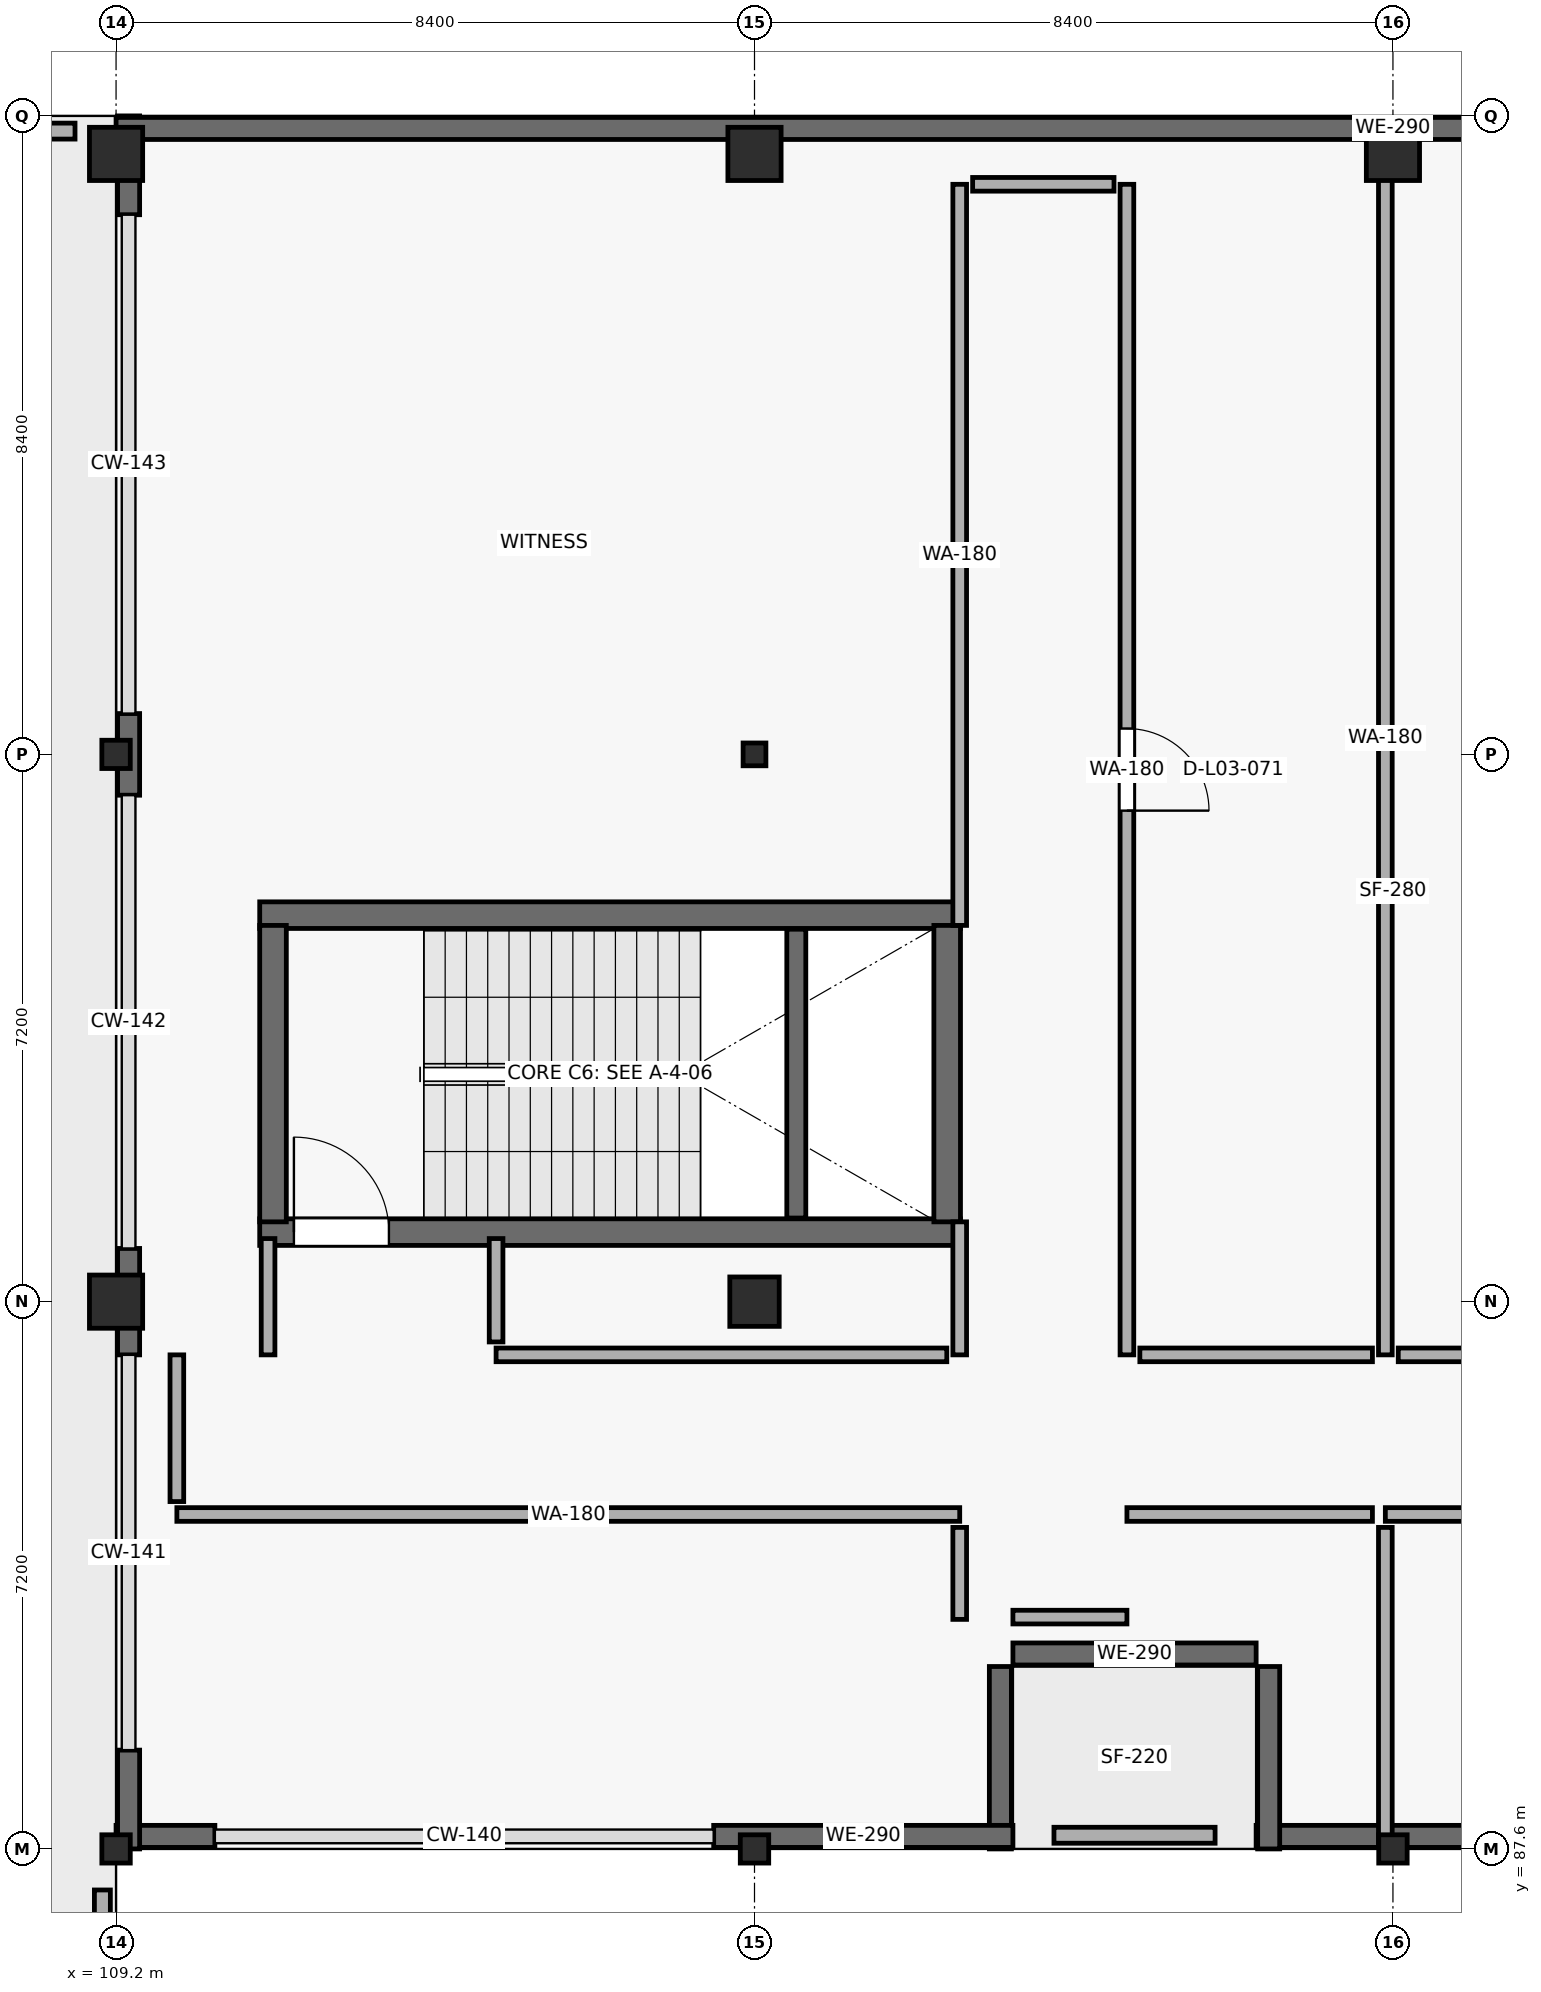
"""IFC4 building model, lengths in metres.
Left out: names, types, materials, properties, quantities, classifications, styles, units other than length and angle.
Written with IfcOpenShell. Run it as: python <this file> out.ifc"""

import sys

from ifc_helpers import new_model, si_unit, direction, frame, frame_2d, origin, origin_2d, place, context, subcontext, project, spatial, rectangle, hollow_rectangle, i_section, extrude, element, fill, save


model = new_model("IFC4")
c1 = context("Model", 3, precision=1e-05, world=origin(), true_north=direction((0.0, 1.0)))
c2 = subcontext(c1, "Body", "Model", "MODEL_VIEW")
j1 = project(units=[si_unit("LENGTHUNIT", "METRE"), si_unit("PLANEANGLEUNIT", "RADIAN")], contexts=[c1])
p1 = place(None, origin())
s1 = spatial("IfcSite", under=j1, at=p1, CompositionType="ELEMENT")
p2 = place(p1, origin())
s2 = spatial("IfcBuilding", under=s1, at=p2, CompositionType="ELEMENT")
p3 = place(p2, frame((0.0, 0.0, 10.2)))
s3 = spatial("IfcBuildingStorey", under=s2, at=p3, CompositionType="ELEMENT", Elevation=10.2)
p4 = place(p3, frame((109.2, 87.6, 0.0), z_axis=(0.0, 0.0, 1.0), x_axis=(1.0, 0.0, 0.0)))
e1 = element("IfcColumn", 1, at=p4, inside=s3, PredefinedType="COLUMN", context=c2, shape_type="SweptSolid", body=[
    extrude(i_section(OverallWidth=0.374, OverallDepth=0.372, WebThickness=0.016, FlangeThickness=0.026, at=origin_2d()), origin(), (0.0, 0.0, 1.0), 5.1),
])
p5 = place(p3, frame((109.2, 94.8, 0.0), z_axis=(0.0, 0.0, 1.0), x_axis=(1.0, 0.0, 0.0)))
e2 = element("IfcColumn", 2, at=p5, inside=s3, PredefinedType="COLUMN", context=c2, shape_type="SweptSolid", body=[
    extrude(rectangle(XDim=0.7, YDim=0.7, at=origin_2d()), origin(), (0.0, 0.0, 1.0), 5.1),
])
p6 = place(p3, frame((109.2, 102.0, 0.0), z_axis=(0.0, 0.0, 1.0), x_axis=(1.0, 0.0, 0.0)))
e3 = element("IfcColumn", 3, at=p6, inside=s3, PredefinedType="COLUMN", context=c2, shape_type="SweptSolid", body=[
    extrude(i_section(OverallWidth=0.374, OverallDepth=0.372, WebThickness=0.016, FlangeThickness=0.026, at=origin_2d()), origin(), (0.0, 0.0, 1.0), 5.1),
])
p7 = place(p3, frame((109.2, 109.9, 0.0), z_axis=(0.0, 0.0, 1.0), x_axis=(1.0, 0.0, 0.0)))
e4 = element("IfcColumn", 4, at=p7, inside=s3, PredefinedType="COLUMN", context=c2, shape_type="SweptSolid", body=[
    extrude(rectangle(XDim=0.7, YDim=0.7, at=origin_2d()), origin(), (0.0, 0.0, 1.0), 5.1),
])
p8 = place(p3, frame((117.6, 87.6, 0.0), z_axis=(0.0, 0.0, 1.0), x_axis=(1.0, 0.0, 0.0)))
e5 = element("IfcColumn", 5, at=p8, inside=s3, PredefinedType="COLUMN", context=c2, shape_type="SweptSolid", body=[
    extrude(i_section(OverallWidth=0.374, OverallDepth=0.372, WebThickness=0.016, FlangeThickness=0.026, at=origin_2d()), origin(), (0.0, 0.0, 1.0), 5.1),
])
p9 = place(p3, frame((117.6, 94.8, 0.0), z_axis=(0.0, 0.0, 1.0), x_axis=(1.0, 0.0, 0.0)))
e6 = element("IfcColumn", 6, at=p9, inside=s3, PredefinedType="COLUMN", context=c2, shape_type="SweptSolid", body=[
    extrude(rectangle(XDim=0.65, YDim=0.65, at=origin_2d()), origin(), (0.0, 0.0, 1.0), 5.1),
])
p10 = place(p3, frame((117.6, 102.0, 0.0), z_axis=(0.0, 0.0, 1.0), x_axis=(1.0, 0.0, 0.0)))
e7 = element("IfcColumn", 7, at=p10, inside=s3, PredefinedType="COLUMN", context=c2, shape_type="SweptSolid", body=[
    extrude(hollow_rectangle(XDim=0.3, YDim=0.3, WallThickness=0.012, at=origin_2d()), origin(), (0.0, 0.0, 1.0), 5.1),
])
p11 = place(p3, frame((117.6, 109.9, 0.0), z_axis=(0.0, 0.0, 1.0), x_axis=(1.0, 0.0, 0.0)))
e8 = element("IfcColumn", 8, at=p11, inside=s3, PredefinedType="COLUMN", context=c2, shape_type="SweptSolid", body=[
    extrude(rectangle(XDim=0.7, YDim=0.7, at=origin_2d()), origin(), (0.0, 0.0, 1.0), 5.1),
])
p12 = place(p3, frame((126.0, 87.6, 0.0), z_axis=(0.0, 0.0, 1.0), x_axis=(1.0, 0.0, 0.0)))
e9 = element("IfcColumn", 9, at=p12, inside=s3, PredefinedType="COLUMN", context=c2, shape_type="SweptSolid", body=[
    extrude(i_section(OverallWidth=0.374, OverallDepth=0.372, WebThickness=0.016, FlangeThickness=0.026, at=origin_2d()), origin(), (0.0, 0.0, 1.0), 5.1),
])
p13 = place(p3, frame((126.0, 109.9, 0.0), z_axis=(0.0, 0.0, 1.0), x_axis=(1.0, 0.0, 0.0)))
e10 = element("IfcColumn", 10, at=p13, inside=s3, PredefinedType="COLUMN", context=c2, shape_type="SweptSolid", body=[
    extrude(rectangle(XDim=0.7, YDim=0.7, at=origin_2d()), origin(), (0.0, 0.0, 1.0), 5.1),
])
p14 = place(p3, frame((142.8, 87.765, 0.0), z_axis=(0.0, 0.0, 1.0), x_axis=(-1.0, 0.0, 0.0)))
e11 = element("IfcWall", 11, at=p14, inside=s3, PredefinedType="SOLIDWALL", context=c2, shape_type="SweptSolid", body=[
    extrude(rectangle(XDim=18.6, YDim=0.29, at=frame_2d((9.3, 0.0))), origin(), (0.0, 0.0, 1.0), 4.82),
])
p15 = place(p3, frame((124.365, 87.6, 0.0), z_axis=(0.0, 0.0, 1.0), x_axis=(0.0, 1.0, 0.0)))
e12 = element("IfcWall", 12, at=p15, inside=s3, PredefinedType="SOLIDWALL", context=c2, shape_type="SweptSolid", body=[
    extrude(rectangle(XDim=2.4, YDim=0.29, at=frame_2d((1.2, 0.0))), origin(), (0.0, 0.0, 1.0), 4.82),
])
p16 = place(p3, frame((124.2, 90.165, 0.0), z_axis=(0.0, 0.0, 1.0), x_axis=(-1.0, 0.0, 0.0)))
e13 = element("IfcWall", 13, at=p16, inside=s3, PredefinedType="SOLIDWALL", context=c2, shape_type="SweptSolid", body=[
    extrude(rectangle(XDim=3.2, YDim=0.29, at=frame_2d((1.6, 0.0))), origin(), (0.0, 0.0, 1.0), 4.82),
])
p17 = place(p3, frame((120.835, 90.0, 0.0), z_axis=(0.0, 0.0, 1.0), x_axis=(0.0, -1.0, 0.0)))
e14 = element("IfcWall", 14, at=p17, inside=s3, PredefinedType="SOLIDWALL", context=c2, shape_type="SweptSolid", body=[
    extrude(rectangle(XDim=2.4, YDim=0.29, at=frame_2d((1.2, 0.0))), origin(), (0.0, 0.0, 1.0), 4.82),
])
p18 = place(p3, frame((121.0, 87.765, 0.0), z_axis=(0.0, 0.0, 1.0), x_axis=(-1.0, 0.0, 0.0)))
e15 = element("IfcWall", 15, at=p18, inside=s3, PredefinedType="SOLIDWALL", context=c2, shape_type="SweptSolid", body=[
    extrude(rectangle(XDim=3.937, YDim=0.29, at=frame_2d((1.969, 0.0))), origin(), (0.0, 0.0, 1.0), 4.82),
])
p19 = place(p3, frame((110.5, 87.765, 0.0), z_axis=(0.0, 0.0, 1.0), x_axis=(-1.0, 0.0, 0.0)))
e16 = element("IfcWall", 16, at=p19, inside=s3, PredefinedType="SOLIDWALL", context=c2, shape_type="SweptSolid", body=[
    extrude(rectangle(XDim=1.3, YDim=0.29, at=frame_2d((0.65, 0.0))), origin(), (0.0, 0.0, 1.0), 4.82),
])
p20 = place(p3, frame((109.365, 87.6, 0.0), z_axis=(0.0, 0.0, 1.0), x_axis=(0.0, 1.0, 0.0)))
e17 = element("IfcWall", 17, at=p20, inside=s3, PredefinedType="SOLIDWALL", context=c2, shape_type="SweptSolid", body=[
    extrude(rectangle(XDim=1.3, YDim=0.29, at=frame_2d((0.65, 0.0))), origin(), (0.0, 0.0, 1.0), 4.82),
])
p21 = place(p3, frame((109.365, 94.1, 0.0), z_axis=(0.0, 0.0, 1.0), x_axis=(0.0, 1.0, 0.0)))
e18 = element("IfcWall", 18, at=p21, inside=s3, PredefinedType="SOLIDWALL", context=c2, shape_type="SweptSolid", body=[
    extrude(rectangle(XDim=1.4, YDim=0.29, at=frame_2d((0.7, 0.0))), origin(), (0.0, 0.0, 1.0), 4.82),
])
p22 = place(p3, frame((109.365, 101.463, 0.0), z_axis=(0.0, 0.0, 1.0), x_axis=(0.0, 1.0, 0.0)))
e19 = element("IfcWall", 19, at=p22, inside=s3, PredefinedType="SOLIDWALL", context=c2, shape_type="SweptSolid", body=[
    extrude(rectangle(XDim=1.074, YDim=0.29, at=frame_2d((0.537, 0.0))), origin(), (0.0, 0.0, 1.0), 4.82),
])
p23 = place(p3, frame((109.365, 109.1, 0.0), z_axis=(0.0, 0.0, 1.0), x_axis=(0.0, 1.0, 0.0)))
e20 = element("IfcWall", 20, at=p23, inside=s3, PredefinedType="SOLIDWALL", context=c2, shape_type="SweptSolid", body=[
    extrude(rectangle(XDim=1.3, YDim=0.29, at=frame_2d((0.65, 0.0))), origin(), (0.0, 0.0, 1.0), 4.82),
])
p24 = place(p3, frame((109.2, 110.235, 0.0), z_axis=(0.0, 0.0, 1.0), x_axis=(1.0, 0.0, 0.0)))
e21 = element("IfcWall", 21, at=p24, inside=s3, PredefinedType="SOLIDWALL", context=c2, shape_type="SweptSolid", body=[
    extrude(rectangle(XDim=33.6, YDim=0.29, at=frame_2d((16.8, 0.0))), origin(), (0.0, 0.0, 1.0), 4.82),
])
p25 = place(p3, frame((100.92, 110.2, 0.0), z_axis=(0.0, 0.0, 1.0), x_axis=(1.0, 0.0, 0.0)))
e22 = element("IfcWall", 22, at=p25, inside=s3, PredefinedType="PARAPET", context=c2, shape_type="SweptSolid", body=[
    extrude(rectangle(XDim=7.74, YDim=0.21, at=frame_2d((3.87, 0.0))), origin(), (0.0, 0.0, 1.0), 1.12),
])
p26 = place(p3, frame((109.02, 87.06, 0.0), z_axis=(0.0, 0.0, 1.0), x_axis=(0.0, -1.0, 0.0)))
e23 = element("IfcWall", 23, at=p26, inside=s3, PredefinedType="PARAPET", context=c2, shape_type="SweptSolid", body=[
    extrude(rectangle(XDim=16.14, YDim=0.21, at=frame_2d((8.07, 0.0))), origin(), (0.0, 0.0, 1.0), 1.12),
])
p27 = place(p3, frame((123.66, 87.78, 0.0), z_axis=(0.0, 0.0, 1.0), x_axis=(-1.0, 0.0, 0.0)))
e24 = element("IfcWall", 24, at=p27, inside=s3, PredefinedType="PARAPET", context=c2, shape_type="SweptSolid", body=[
    extrude(rectangle(XDim=2.12, YDim=0.21, at=frame_2d((1.06, 0.0))), origin(), (0.0, 0.0, 1.0), 1.12),
])
p28 = place(p3, frame((111.09, 95.715, 0.0), z_axis=(0.0, 0.0, 1.0), x_axis=(1.0, 0.0, 0.0)))
e25 = element("IfcWall", 25, at=p28, inside=s3, PredefinedType="SHEAR", context=c2, shape_type="SweptSolid", body=[
    extrude(rectangle(XDim=9.22, YDim=0.35, at=frame_2d((4.61, 0.0))), origin(), (0.0, 0.0, 1.0), 4.82),
])
p29 = place(p28, frame((0.45, 0.0, 0.0)))
e26 = element("IfcOpeningElement", 26, at=p29, cuts=e25, PredefinedType="OPENING", context=c2, shape_type="SweptSolid", body=[
    extrude(rectangle(XDim=1.25, YDim=2.2, at=frame_2d((0.625, 1.1))), frame((0.0, 0.185, 0.0), z_axis=(0.0, -1.0, 0.0), x_axis=(1.0, 0.0, 0.0)), (0.0, 0.0, 1.0), 0.37),
])
p30 = place(p3, frame((120.31, 99.885, 0.0), z_axis=(0.0, 0.0, 1.0), x_axis=(-1.0, 0.0, 0.0)))
e27 = element("IfcWall", 27, at=p30, inside=s3, PredefinedType="SHEAR", context=c2, shape_type="SweptSolid", body=[
    extrude(rectangle(XDim=9.22, YDim=0.35, at=frame_2d((4.61, 0.0))), origin(), (0.0, 0.0, 1.0), 4.82),
])
for number, where, z_axis, x_axis in (
    (28, (111.265, 95.85, 0.0), (0.0, 0.0, 1.0), (0.0, 1.0, 0.0)),
    (29, (120.135, 99.75, 0.0), (0.0, 0.0, 1.0), (0.0, -1.0, 0.0)),
):
    element("IfcWall", number, at=place(p3, frame(where, z_axis=z_axis, x_axis=x_axis)), inside=s3, PredefinedType="SHEAR", context=c2, shape_type="SweptSolid", body=[
        extrude(rectangle(XDim=3.9, YDim=0.35, at=frame_2d((1.95, 0.0))), origin(), (0.0, 0.0, 1.0), 4.82),
    ])
p31 = place(p3, frame((118.15, 95.9, 0.0), z_axis=(0.0, 0.0, 1.0), x_axis=(0.0, 1.0, 0.0)))
e30 = element("IfcWall", 30, at=p31, inside=s3, PredefinedType="SHEAR", context=c2, shape_type="SweptSolid", body=[
    extrude(rectangle(XDim=3.8, YDim=0.25, at=frame_2d((1.9, 0.0))), origin(), (0.0, 0.0, 1.0), 2.37),
])
p32 = place(p3, frame((125.9, 110.34, 0.0), z_axis=(0.0, 0.0, 1.0), x_axis=(0.0, -1.0, 0.0)))
e31 = element("IfcWall", 31, at=p32, inside=s3, PredefinedType="PARTITIONING", context=c2, shape_type="SweptSolid", body=[
    extrude(rectangle(XDim=16.24, YDim=0.18, at=frame_2d((8.12, 0.0))), origin(), (0.0, 0.0, 1.0), 3.45),
])
p33 = place(p3, frame((125.9, 92.0, 0.0), z_axis=(0.0, 0.0, 1.0), x_axis=(1.0, 0.0, 0.0)))
e32 = element("IfcWall", 32, at=p33, inside=s3, PredefinedType="PARTITIONING", context=c2, shape_type="SweptSolid", body=[
    extrude(rectangle(XDim=15.9, YDim=0.18, at=frame_2d((7.95, 0.0))), origin(), (0.0, 0.0, 1.0), 4.82),
])
p34 = place(p33, frame((6.81, 0.0, 0.0)))
e33 = element("IfcOpeningElement", 33, at=p34, cuts=e32, PredefinedType="OPENING", context=c2, shape_type="SweptSolid", body=[
    extrude(rectangle(XDim=2.28, YDim=2.75, at=frame_2d((1.14, 1.375))), frame((0.0, 0.1, 0.0), z_axis=(0.0, -1.0, 0.0), x_axis=(1.0, 0.0, 0.0)), (0.0, 0.0, 1.0), 0.2),
])
p35 = place(p3, frame((141.8, 94.1, 0.0), z_axis=(0.0, 0.0, 1.0), x_axis=(-1.0, 0.0, 0.0)))
e34 = element("IfcWall", 34, at=p35, inside=s3, PredefinedType="PARTITIONING", context=c2, shape_type="SweptSolid", body=[
    extrude(rectangle(XDim=15.73, YDim=0.18, at=frame_2d((7.865, 0.0))), origin(), (0.0, 0.0, 1.0), 4.82),
])
p36 = place(p3, frame((122.5, 94.1, 0.0), z_axis=(0.0, 0.0, 1.0), x_axis=(0.0, 1.0, 0.0)))
e35 = element("IfcWall", 35, at=p36, inside=s3, PredefinedType="PARTITIONING", context=c2, shape_type="SweptSolid", body=[
    extrude(rectangle(XDim=15.4, YDim=0.18, at=frame_2d((7.7, 0.0))), origin(), (0.0, 0.0, 1.0), 4.82),
])
p37 = place(p36, frame((7.16, 0.0, 0.0)))
e36 = element("IfcOpeningElement", 36, at=p37, cuts=e35, PredefinedType="OPENING", context=c2, shape_type="SweptSolid", body=[
    extrude(rectangle(XDim=1.08, YDim=2.28, at=frame_2d((0.54, 1.14))), frame((0.0, 0.1, 0.0), z_axis=(0.0, -1.0, 0.0), x_axis=(1.0, 0.0, 0.0)), (0.0, 0.0, 1.0), 0.2),
])
p38 = place(p3, frame((120.3, 109.5, 0.0), z_axis=(0.0, 0.0, 1.0), x_axis=(0.0, -1.0, 0.0)))
e37 = element("IfcWall", 37, at=p38, inside=s3, PredefinedType="PARTITIONING", context=c2, shape_type="SweptSolid", body=[
    extrude(rectangle(XDim=9.75, YDim=0.18, at=frame_2d((4.875, 0.0))), origin(), (0.0, 0.0, 1.0), 4.82),
])
p39 = place(p3, frame((120.3, 95.85, 0.0), z_axis=(0.0, 0.0, 1.0), x_axis=(0.0, -1.0, 0.0)))
e38 = element("IfcWall", 38, at=p39, inside=s3, PredefinedType="PARTITIONING", context=c2, shape_type="SweptSolid", body=[
    extrude(rectangle(XDim=1.75, YDim=0.18, at=frame_2d((0.875, 0.0))), origin(), (0.0, 0.0, 1.0), 4.82),
])
p40 = place(p3, frame((110.0, 92.0, 0.0), z_axis=(0.0, 0.0, 1.0), x_axis=(1.0, 0.0, 0.0)))
e39 = element("IfcWall", 39, at=p40, inside=s3, PredefinedType="PARTITIONING", context=c2, shape_type="SweptSolid", body=[
    extrude(rectangle(XDim=10.3, YDim=0.18, at=frame_2d((5.15, 0.0))), origin(), (0.0, 0.0, 1.0), 4.82),
])
p41 = place(p3, frame((120.13, 94.1, 0.0), z_axis=(0.0, 0.0, 1.0), x_axis=(-1.0, 0.0, 0.0)))
e40 = element("IfcWall", 40, at=p41, inside=s3, PredefinedType="PARTITIONING", context=c2, shape_type="SweptSolid", body=[
    extrude(rectangle(XDim=5.93, YDim=0.18, at=frame_2d((2.965, 0.0))), origin(), (0.0, 0.0, 1.0), 4.82),
])
p42 = place(p3, frame((125.9, 91.83, 0.0), z_axis=(0.0, 0.0, 1.0), x_axis=(0.0, -1.0, 0.0)))
e41 = element("IfcWall", 41, at=p42, inside=s3, PredefinedType="PARTITIONING", context=c2, shape_type="SweptSolid", body=[
    extrude(rectangle(XDim=4.17, YDim=0.18, at=frame_2d((2.085, 0.0))), origin(), (0.0, 0.0, 1.0), 3.45),
])
p43 = place(p3, frame((125.73, 94.1, 0.0), z_axis=(0.0, 0.0, 1.0), x_axis=(-1.0, 0.0, 0.0)))
e42 = element("IfcWall", 42, at=p43, inside=s3, PredefinedType="PARTITIONING", context=c2, shape_type="SweptSolid", body=[
    extrude(rectangle(XDim=3.06, YDim=0.18, at=frame_2d((1.53, 0.0))), origin(), (0.0, 0.0, 1.0), 4.82),
])
p44 = place(p3, frame((122.5, 92.0, 0.0), z_axis=(0.0, 0.0, 1.0), x_axis=(1.0, 0.0, 0.0)))
e43 = element("IfcWall", 43, at=p44, inside=s3, PredefinedType="PARTITIONING", context=c2, shape_type="SweptSolid", body=[
    extrude(rectangle(XDim=3.23, YDim=0.18, at=frame_2d((1.615, 0.0))), origin(), (0.0, 0.0, 1.0), 4.82),
])
p45 = place(p3, frame((122.33, 109.5, 0.0), z_axis=(0.0, 0.0, 1.0), x_axis=(-1.0, 0.0, 0.0)))
e44 = element("IfcWall", 44, at=p45, inside=s3, PredefinedType="PARTITIONING", context=c2, shape_type="SweptSolid", body=[
    extrude(rectangle(XDim=1.86, YDim=0.18, at=frame_2d((0.93, 0.0))), origin(), (0.0, 0.0, 1.0), 3.9),
])
p46 = place(p3, frame((110.0, 94.1, 0.0), z_axis=(0.0, 0.0, 1.0), x_axis=(0.0, -1.0, 0.0)))
e45 = element("IfcWall", 45, at=p46, inside=s3, PredefinedType="PARTITIONING", context=c2, shape_type="SweptSolid", body=[
    extrude(rectangle(XDim=1.93, YDim=0.18, at=frame_2d((0.965, 0.0))), origin(), (0.0, 0.0, 1.0), 4.82),
])
p47 = place(p3, frame((114.2, 94.27, 0.0), z_axis=(0.0, 0.0, 1.0), x_axis=(0.0, 1.0, 0.0)))
e46 = element("IfcWall", 46, at=p47, inside=s3, PredefinedType="PARTITIONING", context=c2, shape_type="SweptSolid", body=[
    extrude(rectangle(XDim=1.36, YDim=0.18, at=frame_2d((0.68, 0.0))), origin(), (0.0, 0.0, 1.0), 4.82),
])
p48 = place(p3, frame((111.2, 95.63, 0.0), z_axis=(0.0, 0.0, 1.0), x_axis=(0.0, -1.0, 0.0)))
e47 = element("IfcWall", 47, at=p48, inside=s3, PredefinedType="PARTITIONING", context=c2, shape_type="SweptSolid", body=[
    extrude(rectangle(XDim=1.53, YDim=0.18, at=frame_2d((0.765, 0.0))), origin(), (0.0, 0.0, 1.0), 4.82),
])
p49 = place(p3, frame((121.0, 90.65, 0.0), z_axis=(0.0, 0.0, 1.0), x_axis=(1.0, 0.0, 0.0)))
e48 = element("IfcWall", 48, at=p49, inside=s3, PredefinedType="PARTITIONING", context=c2, shape_type="SweptSolid", body=[
    extrude(rectangle(XDim=1.5, YDim=0.18, at=frame_2d((0.75, 0.0))), origin(), (0.0, 0.0, 1.0), 4.82),
])
p50 = place(p3, frame((120.3, 91.83, 0.0), z_axis=(0.0, 0.0, 1.0), x_axis=(0.0, -1.0, 0.0)))
e49 = element("IfcWall", 49, at=p50, inside=s3, PredefinedType="PARTITIONING", context=c2, shape_type="SweptSolid", body=[
    extrude(rectangle(XDim=1.21, YDim=0.18, at=frame_2d((0.605, 0.0))), origin(), (0.0, 0.0, 1.0), 4.82),
])
p51 = place(p29, origin())
e50 = element("IfcDoor", 50, at=p51, inside=s3, OperationType="SINGLE_SWING_LEFT", PredefinedType="DOOR", context=c2, shape_type="SweptSolid", body=[
    extrude(rectangle(XDim=1.25, YDim=2.2, at=frame_2d((0.625, 1.1))), frame((0.0, 0.025, 0.0), z_axis=(0.0, -1.0, 0.0), x_axis=(1.0, 0.0, 0.0)), (0.0, 0.0, 1.0), 0.05),
])
fill(e26, e50)
p52 = place(p37, origin())
e51 = element("IfcDoor", 51, at=p52, inside=s3, OperationType="SINGLE_SWING_RIGHT", PredefinedType="DOOR", context=c2, shape_type="SweptSolid", body=[
    extrude(rectangle(XDim=1.08, YDim=2.28, at=frame_2d((0.54, 1.14))), frame((0.0, 0.025, 0.0), z_axis=(0.0, -1.0, 0.0), x_axis=(1.0, 0.0, 0.0)), (0.0, 0.0, 1.0), 0.05),
])
fill(e36, e51)
save(model, sys.argv[1])
